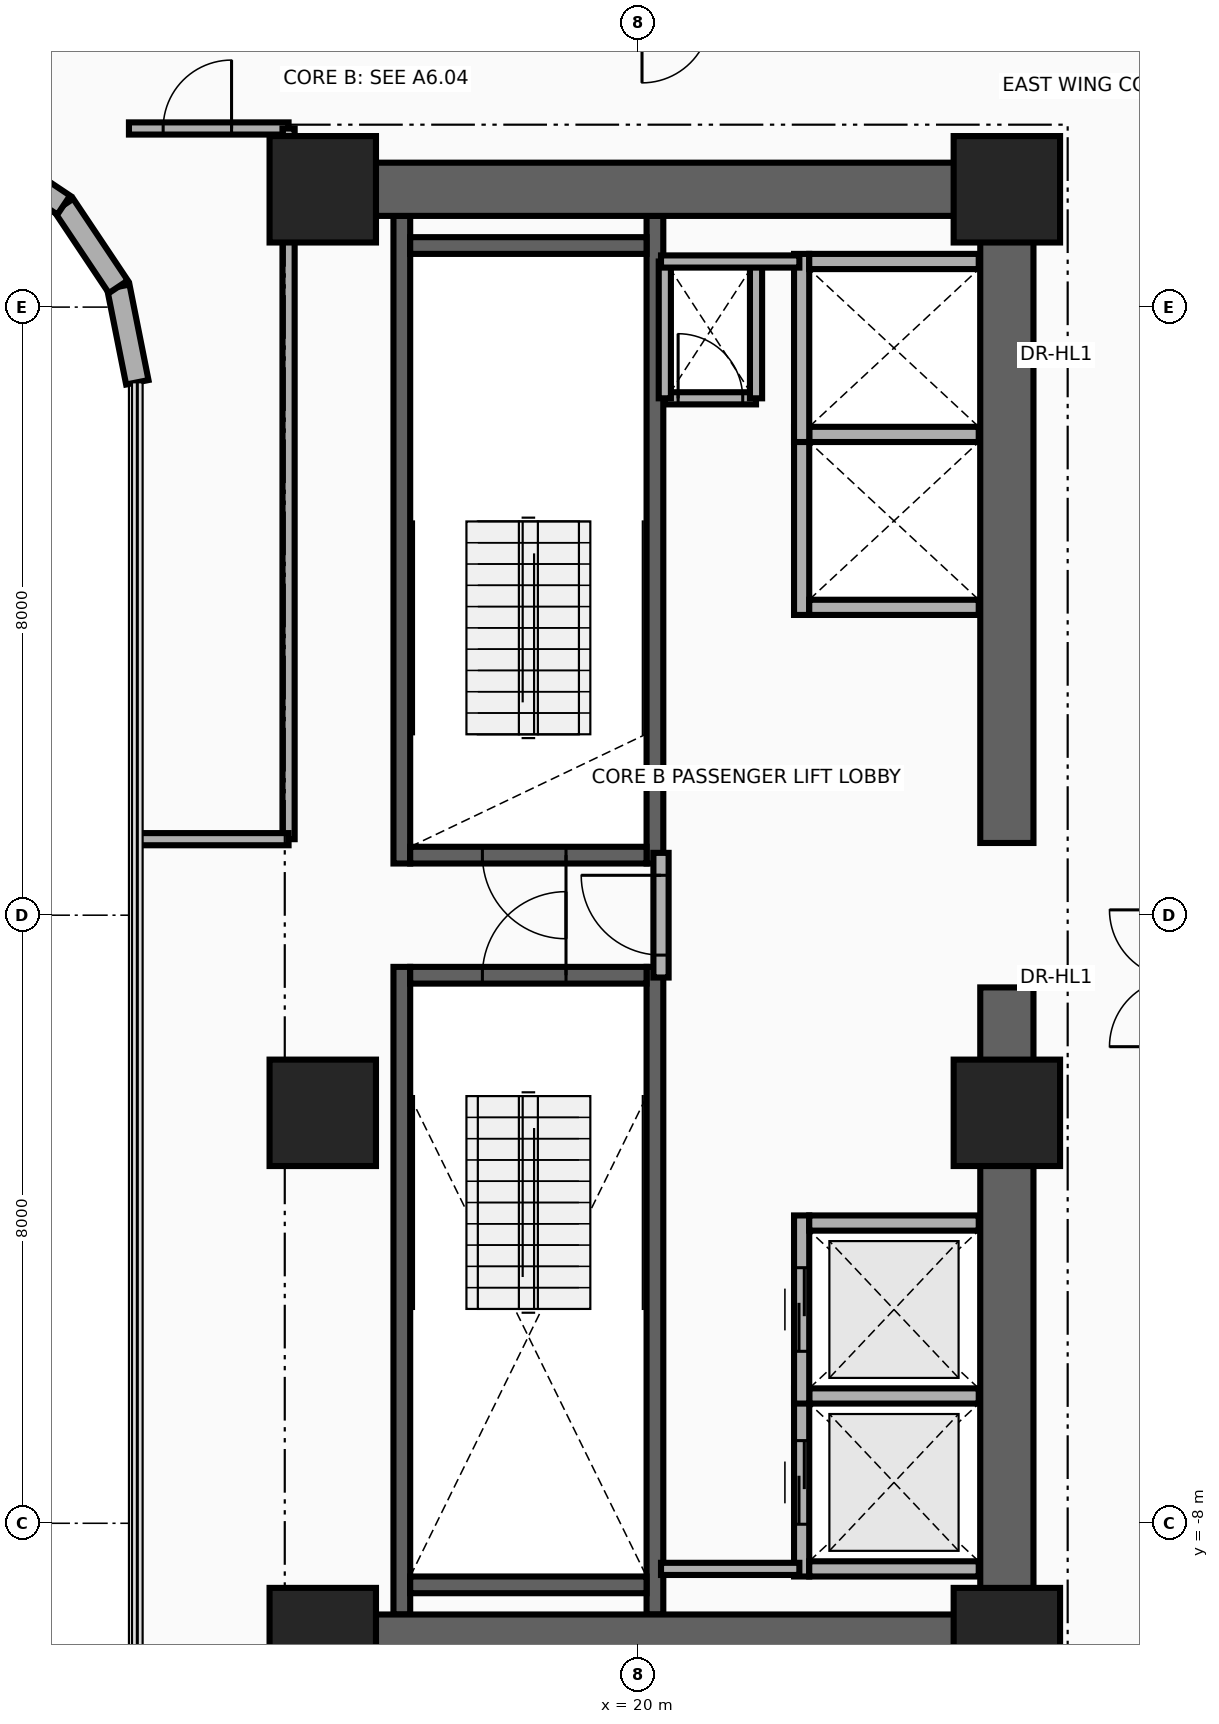
"""IFC4 building model, lengths in metres.
Left out: names, types, materials, properties, quantities, classifications, styles, units other than length and angle.
Written with IfcOpenShell. Run it as: python <this file> out.ifc"""

import sys

from ifc_helpers import new_model, si_unit, direction, frame, frame_2d, origin, origin_2d, place, context, subcontext, project, spatial, rectangle, extrude, source, transform, mapped, element, fill, save


model = new_model("IFC4")
c1 = context("Model", 3, precision=1e-05, world=origin(), true_north=direction((0.0, 1.0)))
c2 = subcontext(c1, "Body", "Model", "MODEL_VIEW")
j1 = project(units=[si_unit("LENGTHUNIT", "METRE"), si_unit("PLANEANGLEUNIT", "RADIAN")], contexts=[c1])
p1 = place(None, origin())
s1 = spatial("IfcSite", under=j1, at=p1, CompositionType="ELEMENT")
p2 = place(p1, origin())
s2 = spatial("IfcBuilding", under=s1, at=p2, CompositionType="ELEMENT")
p3 = place(p2, frame((0.0, 0.0, 55.6)))
s3 = spatial("IfcBuildingStorey", under=s2, at=p3, CompositionType="ELEMENT", Elevation=55.6)
for number, where, z_axis, x_axis in (
    (1, (16.89, 0.68, 0.0), (0.0, 0.0, 1.0), (0.0, 1.0, 0.0)),
    (2, (20.22, 0.68, 0.0), (0.0, 0.0, 1.0), (0.0, 1.0, 0.0)),
):
    element("IfcWall", number, at=place(p3, frame(where, z_axis=z_axis, x_axis=x_axis)), inside=s3, PredefinedType="SHEAR", context=c2, shape_type="SweptSolid", body=[
        extrude(rectangle(XDim=8.52, YDim=0.22, at=frame_2d((4.26, 0.0))), origin(), (0.0, 0.0, 1.0), 3.46),
    ])
p4 = place(p3, frame((17.0, 0.79, 0.0), z_axis=(0.0, 0.0, 1.0), x_axis=(1.0, 0.0, 0.0)))
e3 = element("IfcWall", 3, at=p4, inside=s3, PredefinedType="SHEAR", context=c2, shape_type="SweptSolid", body=[
    extrude(rectangle(XDim=3.11, YDim=0.22, at=frame_2d((1.555, 0.0))), origin(), (0.0, 0.0, 1.0), 3.46),
])
p5 = place(p4, frame((0.95, 0.0, 0.0)))
e4 = element("IfcOpeningElement", 4, at=p5, cuts=e3, PredefinedType="OPENING", context=c2, shape_type="SweptSolid", body=[
    extrude(rectangle(XDim=1.1, YDim=2.15, at=frame_2d((0.55, 1.075))), frame((0.0, 0.125, 0.0), z_axis=(0.0, -1.0, 0.0), x_axis=(1.0, 0.0, 0.0)), (0.0, 0.0, 1.0), 0.25),
])
p6 = place(p3, frame((17.0, 8.81, 0.0), z_axis=(0.0, 0.0, 1.0), x_axis=(1.0, 0.0, 0.0)))
e5 = element("IfcWall", 5, at=p6, inside=s3, PredefinedType="SHEAR", context=c2, shape_type="SweptSolid", body=[
    extrude(rectangle(XDim=3.11, YDim=0.22, at=frame_2d((1.555, 0.0))), origin(), (0.0, 0.0, 1.0), 3.46),
])
for number, where, z_axis, x_axis in (
    (6, (16.89, -9.2, 0.0), (0.0, 0.0, 1.0), (0.0, 1.0, 0.0)),
    (7, (20.22, -9.2, 0.0), (0.0, 0.0, 1.0), (0.0, 1.0, 0.0)),
):
    element("IfcWall", number, at=place(p3, frame(where, z_axis=z_axis, x_axis=x_axis)), inside=s3, PredefinedType="SHEAR", context=c2, shape_type="SweptSolid", body=[
        extrude(rectangle(XDim=8.52, YDim=0.22, at=frame_2d((4.26, 0.0))), origin(), (0.0, 0.0, 1.0), 3.46),
    ])
p7 = place(p3, frame((17.0, -8.81, 0.0), z_axis=(0.0, 0.0, 1.0), x_axis=(1.0, 0.0, 0.0)))
e8 = element("IfcWall", 8, at=p7, inside=s3, PredefinedType="SHEAR", context=c2, shape_type="SweptSolid", body=[
    extrude(rectangle(XDim=3.11, YDim=0.22, at=frame_2d((1.555, 0.0))), origin(), (0.0, 0.0, 1.0), 3.46),
])
p8 = place(p3, frame((17.0, -0.79, 0.0), z_axis=(0.0, 0.0, 1.0), x_axis=(1.0, 0.0, 0.0)))
e9 = element("IfcWall", 9, at=p8, inside=s3, PredefinedType="SHEAR", context=c2, shape_type="SweptSolid", body=[
    extrude(rectangle(XDim=3.11, YDim=0.22, at=frame_2d((1.555, 0.0))), origin(), (0.0, 0.0, 1.0), 3.46),
])
p9 = place(p8, frame((0.95, 0.0, 0.0)))
e10 = element("IfcOpeningElement", 10, at=p9, cuts=e9, PredefinedType="OPENING", context=c2, shape_type="SweptSolid", body=[
    extrude(rectangle(XDim=1.1, YDim=2.15, at=frame_2d((0.55, 1.075))), frame((0.0, 0.125, 0.0), z_axis=(0.0, -1.0, 0.0), x_axis=(1.0, 0.0, 0.0)), (0.0, 0.0, 1.0), 0.25),
])
for number, where, z_axis, x_axis in (
    (11, (24.85, -9.9, 0.0), (0.0, 0.0, 1.0), (0.0, 1.0, 0.0)),
    (12, (24.85, 0.95, 0.0), (0.0, 0.0, 1.0), (0.0, 1.0, 0.0)),
):
    element("IfcWall", number, at=place(p3, frame(where, z_axis=z_axis, x_axis=x_axis)), inside=s3, PredefinedType="SHEAR", context=c2, shape_type="SweptSolid", body=[
        extrude(rectangle(XDim=8.95, YDim=0.7, at=frame_2d((4.475, 0.0))), origin(), (0.0, 0.0, 1.0), 3.46),
    ])
for number, where, z_axis, x_axis in (
    (13, (15.85, 9.55, 0.0), (0.0, 0.0, 1.0), (1.0, 0.0, 0.0)),
    (14, (15.85, -9.55, 0.0), (0.0, 0.0, 1.0), (1.0, 0.0, 0.0)),
):
    element("IfcWall", number, at=place(p3, frame(where, z_axis=z_axis, x_axis=x_axis)), inside=s3, PredefinedType="SHEAR", context=c2, shape_type="SweptSolid", body=[
        extrude(rectangle(XDim=9.0, YDim=0.7, at=frame_2d((4.5, 0.0))), origin(), (0.0, 0.0, 1.0), 3.46),
    ])
m1 = source(origin(), c2, "Body", "SweptSolid", [
    extrude(rectangle(XDim=1.4, YDim=1.4, at=origin_2d()), origin(), (0.0, 0.0, 1.0), 3.7),
])
for number, where, z_axis, x_axis in (
    (15, (15.85, -9.55, 0.0), (0.0, 0.0, 1.0), (1.0, 0.0, 0.0)),
    (16, (24.85, -9.55, 0.0), (0.0, 0.0, 1.0), (1.0, 0.0, 0.0)),
    (17, (15.85, -2.6, 0.0), (0.0, 0.0, 1.0), (1.0, 0.0, 0.0)),
    (18, (24.85, -2.6, 0.0), (0.0, 0.0, 1.0), (1.0, 0.0, 0.0)),
    (19, (15.85, 9.55, 0.0), (0.0, 0.0, 1.0), (1.0, 0.0, 0.0)),
    (20, (24.85, 9.55, 0.0), (0.0, 0.0, 1.0), (1.0, 0.0, 0.0)),
):
    element("IfcColumn", number, at=place(p3, frame(where, z_axis=z_axis, x_axis=x_axis)), inside=s3, PredefinedType="COLUMN", context=c2, shape_type="MappedRepresentation", body=[
        mapped(m1, transform((0.0, 0.0, 0.0), x_axis=(1.0, 0.0, 0.0), y_axis=(0.0, 1.0, 0.0), z_axis=(0.0, 0.0, 1.0), scale=1.0)),
    ])
p10 = place(p3, frame((13.41, 7.011, 0.0), z_axis=(0.0, 0.0, 1.0), x_axis=(-0.195090163074, 0.980785312019, 0.0)))
e21 = element("IfcWall", 21, at=p10, inside=s3, PredefinedType="SOLIDWALL", context=c2, shape_type="SweptSolid", body=[
    extrude(rectangle(XDim=1.281, YDim=0.3, at=frame_2d((0.641, 0.0))), origin(), (0.0, 0.0, 1.0), 3.46),
])
for number, where, z_axis, x_axis in (
    (22, (13.16, 8.268, 0.0), (0.0, 0.0, 1.0), (-0.556, 0.831, 0.0)),
    (23, (12.442, 9.342, 0.0), (0.0, 0.0, 1.0), (-0.831, 0.556, 0.0)),
):
    element("IfcWall", number, at=place(p3, frame(where, z_axis=z_axis, x_axis=x_axis)), inside=s3, PredefinedType="SOLIDWALL", context=c2, shape_type="SweptSolid", body=[
        extrude(rectangle(XDim=1.292, YDim=0.3, at=frame_2d((0.646, 0.0))), origin(), (0.0, 0.0, 1.0), 3.46),
    ])
p11 = place(p3, frame((22.15, -8.7, 0.0), z_axis=(0.0, 0.0, 1.0), x_axis=(0.0, 1.0, 0.0)))
e24 = element("IfcWall", 24, at=p11, inside=s3, PredefinedType="MOVABLE", context=c2, shape_type="SweptSolid", body=[
    extrude(rectangle(XDim=2.475, YDim=0.2, at=frame_2d((1.237, 0.0))), origin(), (0.0, 0.0, 1.0), 3.46),
])
p12 = place(p11, frame((0.688, 0.0, 0.0)))
e25 = element("IfcOpeningElement", 25, at=p12, cuts=e24, PredefinedType="OPENING", context=c2, shape_type="SweptSolid", body=[
    extrude(rectangle(XDim=1.1, YDim=2.1, at=frame_2d((0.55, 1.05))), frame((0.0, 0.115, 0.0), z_axis=(0.0, -1.0, 0.0), x_axis=(1.0, 0.0, 0.0)), (0.0, 0.0, 1.0), 0.23),
])
for number, where, z_axis, x_axis in (
    (26, (22.25, -8.6, 0.0), (0.0, 0.0, 1.0), (1.0, 0.0, 0.0)),
    (27, (22.25, -6.325, 0.0), (0.0, 0.0, 1.0), (1.0, 0.0, 0.0)),
):
    element("IfcWall", number, at=place(p3, frame(where, z_axis=z_axis, x_axis=x_axis)), inside=s3, PredefinedType="MOVABLE", context=c2, shape_type="SweptSolid", body=[
        extrude(rectangle(XDim=2.23, YDim=0.2, at=frame_2d((1.115, 0.0))), origin(), (0.0, 0.0, 1.0), 3.46),
    ])
p13 = place(p3, frame((22.15, -6.425, 0.0), z_axis=(0.0, 0.0, 1.0), x_axis=(0.0, 1.0, 0.0)))
e28 = element("IfcWall", 28, at=p13, inside=s3, PredefinedType="MOVABLE", context=c2, shape_type="SweptSolid", body=[
    extrude(rectangle(XDim=2.475, YDim=0.2, at=frame_2d((1.238, 0.0))), origin(), (0.0, 0.0, 1.0), 3.46),
])
p14 = place(p13, frame((0.688, 0.0, 0.0)))
e29 = element("IfcOpeningElement", 29, at=p14, cuts=e28, PredefinedType="OPENING", context=c2, shape_type="SweptSolid", body=[
    extrude(rectangle(XDim=1.1, YDim=2.1, at=frame_2d((0.55, 1.05))), frame((0.0, 0.115, 0.0), z_axis=(0.0, -1.0, 0.0), x_axis=(1.0, 0.0, 0.0)), (0.0, 0.0, 1.0), 0.23),
])
p15 = place(p3, frame((22.25, -4.05, 0.0), z_axis=(0.0, 0.0, 1.0), x_axis=(1.0, 0.0, 0.0)))
e30 = element("IfcWall", 30, at=p15, inside=s3, PredefinedType="MOVABLE", context=c2, shape_type="SweptSolid", body=[
    extrude(rectangle(XDim=2.23, YDim=0.2, at=frame_2d((1.115, 0.0))), origin(), (0.0, 0.0, 1.0), 3.46),
])
p16 = place(p3, frame((22.15, 3.95, 0.0), z_axis=(0.0, 0.0, 1.0), x_axis=(0.0, 1.0, 0.0)))
e31 = element("IfcWall", 31, at=p16, inside=s3, PredefinedType="MOVABLE", context=c2, shape_type="SweptSolid", body=[
    extrude(rectangle(XDim=2.475, YDim=0.2, at=frame_2d((1.238, 0.0))), origin(), (0.0, 0.0, 1.0), 3.46),
])
for number, where, z_axis, x_axis in (
    (32, (22.25, 4.05, 0.0), (0.0, 0.0, 1.0), (1.0, 0.0, 0.0)),
    (33, (22.25, 6.325, 0.0), (0.0, 0.0, 1.0), (1.0, 0.0, 0.0)),
):
    element("IfcWall", number, at=place(p3, frame(where, z_axis=z_axis, x_axis=x_axis)), inside=s3, PredefinedType="MOVABLE", context=c2, shape_type="SweptSolid", body=[
        extrude(rectangle(XDim=2.23, YDim=0.2, at=frame_2d((1.115, 0.0))), origin(), (0.0, 0.0, 1.0), 2.245),
    ])
p17 = place(p3, frame((22.15, 6.225, 0.0), z_axis=(0.0, 0.0, 1.0), x_axis=(0.0, 1.0, 0.0)))
e34 = element("IfcWall", 34, at=p17, inside=s3, PredefinedType="MOVABLE", context=c2, shape_type="SweptSolid", body=[
    extrude(rectangle(XDim=2.475, YDim=0.2, at=frame_2d((1.237, 0.0))), origin(), (0.0, 0.0, 1.0), 3.46),
])
p18 = place(p3, frame((22.25, 8.6, 0.0), z_axis=(0.0, 0.0, 1.0), x_axis=(1.0, 0.0, 0.0)))
e35 = element("IfcWall", 35, at=p18, inside=s3, PredefinedType="MOVABLE", context=c2, shape_type="SweptSolid", body=[
    extrude(rectangle(XDim=2.23, YDim=0.2, at=frame_2d((1.115, 0.0))), origin(), (0.0, 0.0, 1.0), 2.245),
])
p19 = place(p3, frame((20.3, -0.82, 0.0), z_axis=(0.0, 0.0, 1.0), x_axis=(0.0, 1.0, 0.0)))
e36 = element("IfcWall", 36, at=p19, inside=s3, PredefinedType="PARTITIONING", context=c2, shape_type="SweptSolid", body=[
    extrude(rectangle(XDim=1.64, YDim=0.2, at=frame_2d((0.82, 0.0))), origin(), (0.0, 0.0, 1.0), 3.46),
])
p20 = place(p19, frame((0.295, 0.0, 0.0)))
e37 = element("IfcOpeningElement", 37, at=p20, cuts=e36, PredefinedType="OPENING", context=c2, shape_type="SweptSolid", body=[
    extrude(rectangle(XDim=1.05, YDim=2.15, at=frame_2d((0.525, 1.075))), frame((0.0, 0.115, 0.0), z_axis=(0.0, -1.0, 0.0), x_axis=(1.0, 0.0, 0.0)), (0.0, 0.0, 1.0), 0.23),
])
p21 = place(p3, frame((20.35, 6.8, 0.0), z_axis=(0.0, 0.0, 1.0), x_axis=(1.0, 0.0, 0.0)))
e38 = element("IfcWall", 38, at=p21, inside=s3, PredefinedType="PARTITIONING", context=c2, shape_type="SweptSolid", body=[
    extrude(rectangle(XDim=1.2, YDim=0.16, at=frame_2d((0.6, 0.0))), origin(), (0.0, 0.0, 1.0), 3.46),
])
p22 = place(p21, frame((0.175, 0.0, 0.0)))
e39 = element("IfcOpeningElement", 39, at=p22, cuts=e38, PredefinedType="OPENING", context=c2, shape_type="SweptSolid", body=[
    extrude(rectangle(XDim=0.85, YDim=2.05, at=frame_2d((0.425, 1.025))), frame((0.0, 0.095, 0.0), z_axis=(0.0, -1.0, 0.0), x_axis=(1.0, 0.0, 0.0)), (0.0, 0.0, 1.0), 0.19),
])
for number, where, z_axis, x_axis in (
    (40, (21.55, 6.8, 0.0), (0.0, 0.0, 1.0), (0.0, 1.0, 0.0)),
    (41, (20.35, 6.8, 0.0), (0.0, 0.0, 1.0), (0.0, 1.0, 0.0)),
):
    element("IfcWall", number, at=place(p3, frame(where, z_axis=z_axis, x_axis=x_axis)), inside=s3, PredefinedType="PARTITIONING", context=c2, shape_type="SweptSolid", body=[
        extrude(rectangle(XDim=1.8, YDim=0.16, at=frame_2d((0.9, 0.0))), origin(), (0.0, 0.0, 1.0), 3.46),
    ])
for number, where, z_axis, x_axis in (
    (42, (20.3, -8.6, 0.0), (0.0, 0.0, 1.0), (1.0, 0.0, 0.0)),
    (43, (20.3, 8.6, 0.0), (0.0, 0.0, 1.0), (1.0, 0.0, 0.0)),
):
    element("IfcWall", number, at=place(p3, frame(where, z_axis=z_axis, x_axis=x_axis)), inside=s3, PredefinedType="PARTITIONING", context=c2, shape_type="SweptSolid", body=[
        extrude(rectangle(XDim=1.82, YDim=0.16, at=frame_2d((0.91, 0.0))), origin(), (0.0, 0.0, 1.0), 3.46),
    ])
p23 = place(p3, frame((13.3, 10.35, 0.0), z_axis=(0.0, 0.0, 1.0), x_axis=(1.0, 0.0, 0.0)))
e44 = element("IfcWall", 44, at=p23, inside=s3, PredefinedType="PARTITIONING", context=c2, shape_type="SweptSolid", body=[
    extrude(rectangle(XDim=2.1, YDim=0.16, at=frame_2d((1.05, 0.0))), origin(), (0.0, 0.0, 1.0), 2.583),
])
p24 = place(p23, frame((0.45, 0.0, 0.0)))
e45 = element("IfcOpeningElement", 45, at=p24, cuts=e44, PredefinedType="OPENING", context=c2, shape_type="SweptSolid", body=[
    extrude(rectangle(XDim=0.9, YDim=2.1, at=frame_2d((0.45, 1.05))), frame((0.0, 0.095, 0.0), z_axis=(0.0, -1.0, 0.0), x_axis=(1.0, 0.0, 0.0)), (0.0, 0.0, 1.0), 0.19),
])
p25 = place(p3, frame((15.4, 1.0, 0.0), z_axis=(0.0, 0.0, 1.0), x_axis=(0.0, 1.0, 0.0)))
e46 = element("IfcWall", 46, at=p25, inside=s3, PredefinedType="PARTITIONING", context=c2, shape_type="SweptSolid", body=[
    extrude(rectangle(XDim=9.35, YDim=0.16, at=frame_2d((4.675, 0.0))), origin(), (0.0, 0.0, 1.0), 2.245),
])
p26 = place(p3, frame((13.41, 1.0, 0.0), z_axis=(0.0, 0.0, 1.0), x_axis=(1.0, 0.0, 0.0)))
e47 = element("IfcWall", 47, at=p26, inside=s3, PredefinedType="PARTITIONING", context=c2, shape_type="SweptSolid", body=[
    extrude(rectangle(XDim=1.99, YDim=0.16, at=frame_2d((0.995, 0.0))), origin(), (0.0, 0.0, 1.0), 2.245),
])
p27 = place(p12, origin())
e48 = element("IfcDoor", 48, at=p27, inside=s3, OperationType="DOUBLE_DOOR_SLIDING", PredefinedType="DOOR", context=c2, shape_type="SweptSolid", body=[
    extrude(rectangle(XDim=1.1, YDim=2.1, at=frame_2d((0.55, 1.05))), frame((0.0, 0.025, 0.0), z_axis=(0.0, -1.0, 0.0), x_axis=(1.0, 0.0, 0.0)), (0.0, 0.0, 1.0), 0.05),
])
fill(e25, e48)
p28 = place(p14, origin())
e49 = element("IfcDoor", 49, at=p28, inside=s3, OperationType="DOUBLE_DOOR_SLIDING", PredefinedType="DOOR", context=c2, shape_type="SweptSolid", body=[
    extrude(rectangle(XDim=1.1, YDim=2.1, at=frame_2d((0.55, 1.05))), frame((0.0, 0.025, 0.0), z_axis=(0.0, -1.0, 0.0), x_axis=(1.0, 0.0, 0.0)), (0.0, 0.0, 1.0), 0.05),
])
fill(e29, e49)
p29 = place(p20, origin())
e50 = element("IfcDoor", 50, at=p29, inside=s3, OperationType="SINGLE_SWING_RIGHT", PredefinedType="DOOR", context=c2, shape_type="SweptSolid", body=[
    extrude(rectangle(XDim=1.05, YDim=2.15, at=frame_2d((0.525, 1.075))), frame((0.0, 0.025, 0.0), z_axis=(0.0, -1.0, 0.0), x_axis=(1.0, 0.0, 0.0)), (0.0, 0.0, 1.0), 0.05),
])
fill(e37, e50)
p30 = place(p5, frame((1.1, 0.0, 0.0), z_axis=(0.0, 0.0, 1.0), x_axis=(-1.0, 0.0, 0.0)))
e51 = element("IfcDoor", 51, at=p30, inside=s3, OperationType="SINGLE_SWING_LEFT", PredefinedType="DOOR", context=c2, shape_type="SweptSolid", body=[
    extrude(rectangle(XDim=1.1, YDim=2.15, at=frame_2d((0.55, 1.075))), frame((0.0, 0.025, 0.0), z_axis=(0.0, -1.0, 0.0), x_axis=(1.0, 0.0, 0.0)), (0.0, 0.0, 1.0), 0.05),
])
fill(e4, e51)
p31 = place(p9, origin())
e52 = element("IfcDoor", 52, at=p31, inside=s3, OperationType="SINGLE_SWING_RIGHT", PredefinedType="DOOR", context=c2, shape_type="SweptSolid", body=[
    extrude(rectangle(XDim=1.1, YDim=2.15, at=frame_2d((0.55, 1.075))), frame((0.0, 0.025, 0.0), z_axis=(0.0, -1.0, 0.0), x_axis=(1.0, 0.0, 0.0)), (0.0, 0.0, 1.0), 0.05),
])
fill(e10, e52)
p32 = place(p22, origin())
e53 = element("IfcDoor", 53, at=p32, inside=s3, OperationType="SINGLE_SWING_LEFT", PredefinedType="DOOR", context=c2, shape_type="SweptSolid", body=[
    extrude(rectangle(XDim=0.85, YDim=2.05, at=frame_2d((0.425, 1.025))), frame((0.0, 0.025, 0.0), z_axis=(0.0, -1.0, 0.0), x_axis=(1.0, 0.0, 0.0)), (0.0, 0.0, 1.0), 0.05),
])
fill(e39, e53)
p33 = place(p24, origin())
e54 = element("IfcDoor", 54, at=p33, inside=s3, OperationType="SINGLE_SWING_RIGHT", PredefinedType="DOOR", context=c2, shape_type="SweptSolid", body=[
    extrude(rectangle(XDim=0.9, YDim=2.1, at=frame_2d((0.45, 1.05))), frame((0.0, 0.025, 0.0), z_axis=(0.0, -1.0, 0.0), x_axis=(1.0, 0.0, 0.0)), (0.0, 0.0, 1.0), 0.05),
])
fill(e45, e54)
save(model, sys.argv[1])
